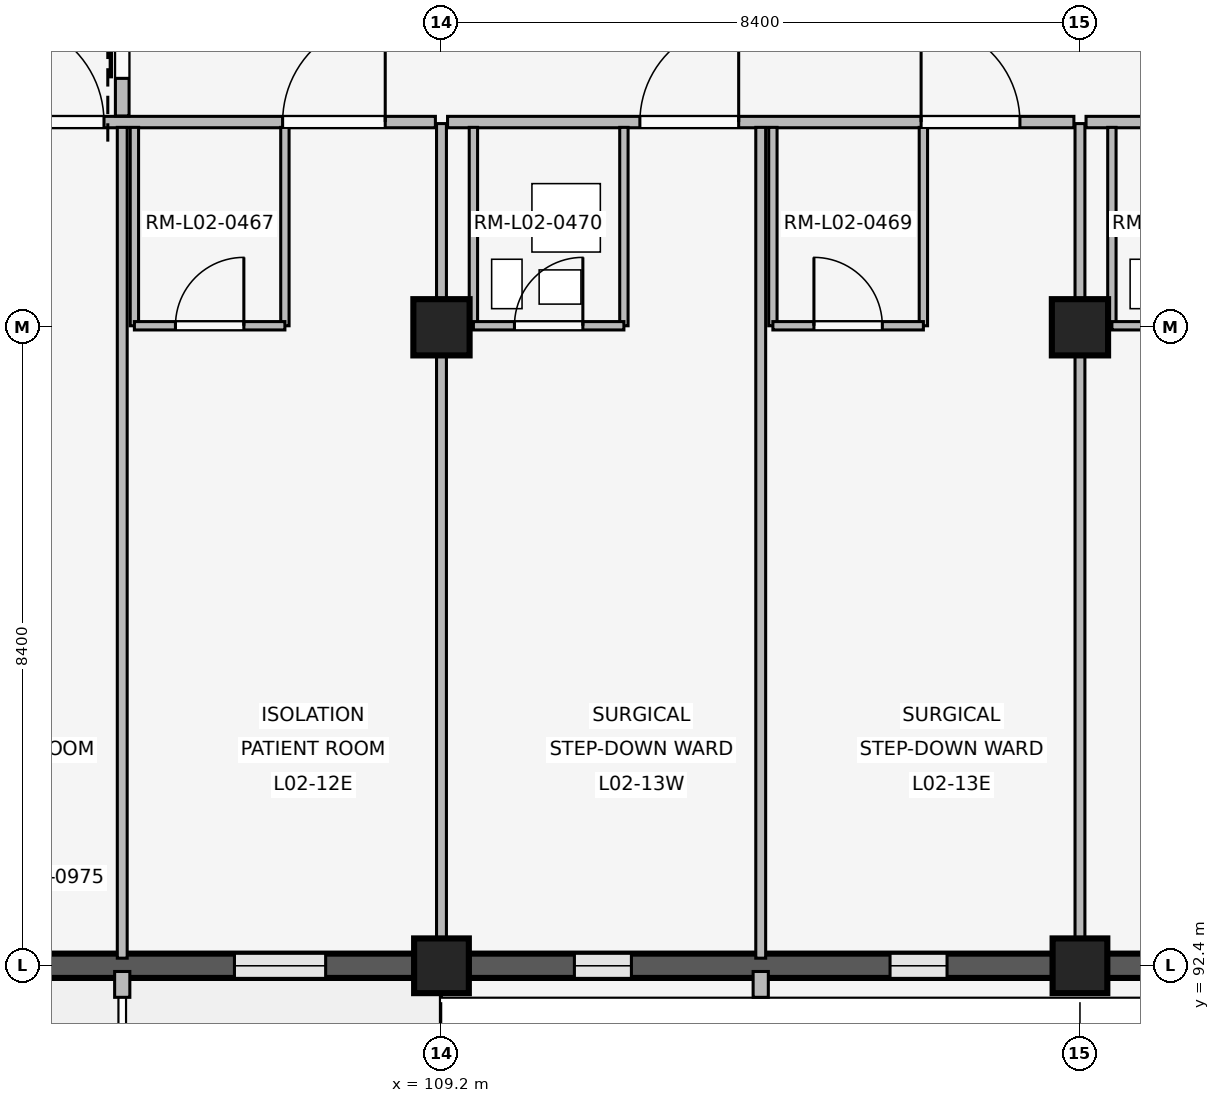
"""IFC4 building model, lengths in metres.
Left out: names, types, materials, properties, quantities, classifications, styles, units other than length and angle.
Written with IfcOpenShell. Run it as: python <this file> out.ifc"""

import sys

from ifc_helpers import new_model, si_unit, direction, frame, frame_2d, origin, origin_2d, place, context, subcontext, project, spatial, rectangle, extrude, element, fill, save


model = new_model("IFC4")
c1 = context("Model", 3, precision=1e-05, world=origin(), true_north=direction((0.0, 1.0)))
c2 = subcontext(c1, "Body", "Model", "MODEL_VIEW")
j1 = project(units=[si_unit("LENGTHUNIT", "METRE"), si_unit("PLANEANGLEUNIT", "RADIAN")], contexts=[c1])
p1 = place(None, origin())
s1 = spatial("IfcSite", under=j1, at=p1, CompositionType="ELEMENT")
p2 = place(p1, origin())
s2 = spatial("IfcBuilding", under=s1, at=p2, CompositionType="ELEMENT")
p3 = place(p2, frame((0.0, 0.0, 8.1)))
s3 = spatial("IfcBuildingStorey", under=s2, at=p3, CompositionType="ELEMENT", Elevation=8.1)
p4 = place(p3, frame((109.2, 92.4, 0.0), z_axis=(0.0, 0.0, 1.0), x_axis=(1.0, 0.0, 0.0)))
e1 = element("IfcColumn", 1, at=p4, inside=s3, PredefinedType="COLUMN", context=c2, shape_type="SweptSolid", body=[
    extrude(rectangle(XDim=0.72, YDim=0.72, at=origin_2d()), origin(), (0.0, 0.0, 1.0), 4.8),
])
p5 = place(p3, frame((109.2, 100.8, 0.0), z_axis=(0.0, 0.0, 1.0), x_axis=(1.0, 0.0, 0.0)))
e2 = element("IfcColumn", 2, at=p5, inside=s3, PredefinedType="COLUMN", context=c2, shape_type="SweptSolid", body=[
    extrude(rectangle(XDim=0.74, YDim=0.74, at=origin_2d()), origin(), (0.0, 0.0, 1.0), 4.8),
])
p6 = place(p3, frame((117.6, 92.4, 0.0), z_axis=(0.0, 0.0, 1.0), x_axis=(1.0, 0.0, 0.0)))
e3 = element("IfcColumn", 3, at=p6, inside=s3, PredefinedType="COLUMN", context=c2, shape_type="SweptSolid", body=[
    extrude(rectangle(XDim=0.72, YDim=0.72, at=origin_2d()), origin(), (0.0, 0.0, 1.0), 4.8),
])
p7 = place(p3, frame((117.6, 100.8, 0.0), z_axis=(0.0, 0.0, 1.0), x_axis=(1.0, 0.0, 0.0)))
e4 = element("IfcColumn", 4, at=p7, inside=s3, PredefinedType="COLUMN", context=c2, shape_type="SweptSolid", body=[
    extrude(rectangle(XDim=0.74, YDim=0.74, at=origin_2d()), origin(), (0.0, 0.0, 1.0), 4.8),
])
p8 = place(p3, frame((108.845, 92.4, 0.0), z_axis=(0.0, 0.0, 1.0), x_axis=(-1.0, 0.0, 0.0)))
e5 = element("IfcWall", 5, at=p8, inside=s3, PredefinedType="SOLIDWALL", context=c2, shape_type="SweptSolid", body=[
    extrude(rectangle(XDim=7.69, YDim=0.32, at=frame_2d((3.845, 0.0))), origin(), (0.0, 0.0, 1.0), 3.86),
])
p9 = place(p8, frame((1.169, 0.0, 0.85)))
e6 = element("IfcOpeningElement", 6, at=p9, cuts=e5, PredefinedType="OPENING", context=c2, shape_type="SweptSolid", body=[
    extrude(rectangle(XDim=1.2, YDim=1.55, at=frame_2d((0.6, 0.775))), frame((0.0, 0.17, 0.0), z_axis=(0.0, -1.0, 0.0), x_axis=(1.0, 0.0, 0.0)), (0.0, 0.0, 1.0), 0.34),
])
p10 = place(p8, frame((5.321, 0.0, 0.85)))
e7 = element("IfcOpeningElement", 7, at=p10, cuts=e5, PredefinedType="OPENING", context=c2, shape_type="SweptSolid", body=[
    extrude(rectangle(XDim=1.2, YDim=1.55, at=frame_2d((0.6, 0.775))), frame((0.0, 0.17, 0.0), z_axis=(0.0, -1.0, 0.0), x_axis=(1.0, 0.0, 0.0)), (0.0, 0.0, 1.0), 0.34),
])
p11 = place(p3, frame((105.0, 92.325, 0.0), z_axis=(0.0, 0.0, 1.0), x_axis=(0.0, -1.0, 0.0)))
e8 = element("IfcWall", 8, at=p11, inside=s3, PredefinedType="ELEMENTEDWALL", context=c2, shape_type="SweptSolid", body=[
    extrude(rectangle(XDim=0.34, YDim=0.2, at=frame_2d((0.17, 0.0))), origin(), (0.0, 0.0, 1.0), 3.84),
])
p12 = place(p3, frame((117.245, 92.4, 0.0), z_axis=(0.0, 0.0, 1.0), x_axis=(-1.0, 0.0, 0.0)))
e9 = element("IfcWall", 9, at=p12, inside=s3, PredefinedType="SOLIDWALL", context=c2, shape_type="SweptSolid", body=[
    extrude(rectangle(XDim=7.69, YDim=0.32, at=frame_2d((3.845, 0.0))), origin(), (0.0, 0.0, 1.0), 3.86),
])
p13 = place(p12, frame((1.394, 0.0, 0.85)))
e10 = element("IfcOpeningElement", 10, at=p13, cuts=e9, PredefinedType="OPENING", context=c2, shape_type="SweptSolid", body=[
    extrude(rectangle(XDim=0.75, YDim=1.85, at=frame_2d((0.375, 0.925))), frame((0.0, 0.17, 0.0), z_axis=(0.0, -1.0, 0.0), x_axis=(1.0, 0.0, 0.0)), (0.0, 0.0, 1.0), 0.34),
])
p14 = place(p12, frame((5.546, 0.0, 0.85)))
e11 = element("IfcOpeningElement", 11, at=p14, cuts=e9, PredefinedType="OPENING", context=c2, shape_type="SweptSolid", body=[
    extrude(rectangle(XDim=0.75, YDim=1.85, at=frame_2d((0.375, 0.925))), frame((0.0, 0.17, 0.0), z_axis=(0.0, -1.0, 0.0), x_axis=(1.0, 0.0, 0.0)), (0.0, 0.0, 1.0), 0.34),
])
p15 = place(p3, frame((113.4, 92.325, 0.0), z_axis=(0.0, 0.0, 1.0), x_axis=(0.0, -1.0, 0.0)))
e12 = element("IfcWall", 12, at=p15, inside=s3, PredefinedType="ELEMENTEDWALL", context=c2, shape_type="SweptSolid", body=[
    extrude(rectangle(XDim=0.34, YDim=0.2, at=frame_2d((0.17, 0.0))), origin(), (0.0, 0.0, 1.0), 3.84),
])
p16 = place(p3, frame((125.645, 92.4, 0.0), z_axis=(0.0, 0.0, 1.0), x_axis=(-1.0, 0.0, 0.0)))
e13 = element("IfcWall", 13, at=p16, inside=s3, PredefinedType="SOLIDWALL", context=c2, shape_type="SweptSolid", body=[
    extrude(rectangle(XDim=7.69, YDim=0.32, at=frame_2d((3.845, 0.0))), origin(), (0.0, 0.0, 1.0), 3.86),
])
p17 = place(p16, frame((1.444, 0.0, 0.85)))
e14 = element("IfcOpeningElement", 14, at=p17, cuts=e13, PredefinedType="OPENING", context=c2, shape_type="SweptSolid", body=[
    extrude(rectangle(XDim=0.65, YDim=1.75, at=frame_2d((0.325, 0.875))), frame((0.0, 0.17, 0.0), z_axis=(0.0, -1.0, 0.0), x_axis=(1.0, 0.0, 0.0)), (0.0, 0.0, 1.0), 0.34),
])
p18 = place(p16, frame((5.596, 0.0, 0.85)))
e15 = element("IfcOpeningElement", 15, at=p18, cuts=e13, PredefinedType="OPENING", context=c2, shape_type="SweptSolid", body=[
    extrude(rectangle(XDim=0.65, YDim=1.75, at=frame_2d((0.325, 0.875))), frame((0.0, 0.17, 0.0), z_axis=(0.0, -1.0, 0.0), x_axis=(1.0, 0.0, 0.0)), (0.0, 0.0, 1.0), 0.34),
])
p19 = place(p3, frame((100.88, 103.5, 0.0), z_axis=(0.0, 0.0, 1.0), x_axis=(1.0, 0.0, 0.0)))
e16 = element("IfcWall", 16, at=p19, inside=s3, PredefinedType="PARTITIONING", context=c2, shape_type="SweptSolid", body=[
    extrude(rectangle(XDim=8.24, YDim=0.15, at=frame_2d((4.12, 0.0))), origin(), (0.0, 0.0, 1.0), 3.84),
])
p20 = place(p19, frame((2.53, 0.0, 0.0)))
e17 = element("IfcOpeningElement", 17, at=p20, cuts=e16, PredefinedType="OPENING", context=c2, shape_type="SweptSolid", body=[
    extrude(rectangle(XDim=1.35, YDim=2.25, at=frame_2d((0.675, 1.125))), frame((0.0, 0.085, 0.0), z_axis=(0.0, -1.0, 0.0), x_axis=(1.0, 0.0, 0.0)), (0.0, 0.0, 1.0), 0.17),
])
p21 = place(p19, frame((6.23, 0.0, 0.0)))
e18 = element("IfcOpeningElement", 18, at=p21, cuts=e16, PredefinedType="OPENING", context=c2, shape_type="SweptSolid", body=[
    extrude(rectangle(XDim=1.35, YDim=2.25, at=frame_2d((0.675, 1.125))), frame((0.0, 0.085, 0.0), z_axis=(0.0, -1.0, 0.0), x_axis=(1.0, 0.0, 0.0)), (0.0, 0.0, 1.0), 0.17),
])
p22 = place(p3, frame((105.0, 92.5, 0.0), z_axis=(0.0, 0.0, 1.0), x_axis=(0.0, 1.0, 0.0)))
e19 = element("IfcWall", 19, at=p22, inside=s3, PredefinedType="PARTITIONING", context=c2, shape_type="SweptSolid", body=[
    extrude(rectangle(XDim=10.93, YDim=0.13, at=frame_2d((5.465, 0.0))), origin(), (0.0, 0.0, 1.0), 3.84),
])
for number, where, z_axis, x_axis in (
    (20, (105.16, 100.82, 0.0), (0.0, 0.0, 1.0), (0.0, 1.0, 0.0)),
    (21, (107.14, 100.82, 0.0), (0.0, 0.0, 1.0), (0.0, 1.0, 0.0)),
):
    element("IfcWall", number, at=place(p3, frame(where, z_axis=z_axis, x_axis=x_axis)), inside=s3, PredefinedType="PARTITIONING", context=c2, shape_type="SweptSolid", body=[
        extrude(rectangle(XDim=2.61, YDim=0.11, at=frame_2d((1.305, 0.0))), origin(), (0.0, 0.0, 1.0), 3.84),
    ])
p23 = place(p3, frame((105.16, 100.82, 0.0), z_axis=(0.0, 0.0, 1.0), x_axis=(1.0, 0.0, 0.0)))
e22 = element("IfcWall", 22, at=p23, inside=s3, PredefinedType="PARTITIONING", context=c2, shape_type="SweptSolid", body=[
    extrude(rectangle(XDim=1.98, YDim=0.11, at=frame_2d((0.99, 0.0))), origin(), (0.0, 0.0, 1.0), 3.84),
])
p24 = place(p23, frame((0.54, 0.0, 0.0)))
e23 = element("IfcOpeningElement", 23, at=p24, cuts=e22, PredefinedType="OPENING", context=c2, shape_type="SweptSolid", body=[
    extrude(rectangle(XDim=0.9, YDim=2.1, at=frame_2d((0.45, 1.05))), frame((0.0, 0.065, 0.0), z_axis=(0.0, -1.0, 0.0), x_axis=(1.0, 0.0, 0.0)), (0.0, 0.0, 1.0), 0.13),
])
p25 = place(p3, frame((103.65, 93.55, 0.0), z_axis=(0.0, 0.0, 1.0), x_axis=(1.0, 0.0, 0.0)))
e24 = element("IfcWall", 24, at=p25, inside=s3, PredefinedType="PLUMBINGWALL", context=c2, shape_type="SweptSolid", body=[
    extrude(rectangle(XDim=0.9, YDim=0.24, at=frame_2d((0.45, 0.0))), origin(), (0.0, 0.0, 1.0), 3.84),
])
p26 = place(p3, frame((105.0, 103.58, 0.0), z_axis=(0.0, 0.0, 1.0), x_axis=(0.0, 1.0, 0.0)))
e25 = element("IfcWall", 25, at=p26, inside=s3, PredefinedType="PARTITIONING", context=c2, shape_type="SweptSolid", body=[
    extrude(rectangle(XDim=2.84, YDim=0.18, at=frame_2d((1.42, 0.0))), origin(), (0.0, 0.0, 1.0), 3.84),
])
p27 = place(p26, frame((0.495, 0.0, 0.0)))
e26 = element("IfcOpeningElement", 26, at=p27, cuts=e25, PredefinedType="OPENING", context=c2, shape_type="SweptSolid", body=[
    extrude(rectangle(XDim=1.85, YDim=2.3, at=frame_2d((0.925, 1.15))), frame((0.0, 0.1, 0.0), z_axis=(0.0, -1.0, 0.0), x_axis=(1.0, 0.0, 0.0)), (0.0, 0.0, 1.0), 0.2),
])
p28 = place(p3, frame((109.2, 92.54, 0.0), z_axis=(0.0, 0.0, 1.0), x_axis=(0.0, 1.0, 0.0)))
e27 = element("IfcWall", 27, at=p28, inside=s3, PredefinedType="PARTITIONING", context=c2, shape_type="SweptSolid", body=[
    extrude(rectangle(XDim=10.94, YDim=0.13, at=frame_2d((5.47, 0.0))), origin(), (0.0, 0.0, 1.0), 3.84),
])
p29 = place(p3, frame((109.28, 103.5, 0.0), z_axis=(0.0, 0.0, 1.0), x_axis=(1.0, 0.0, 0.0)))
e28 = element("IfcWall", 28, at=p29, inside=s3, PredefinedType="PARTITIONING", context=c2, shape_type="SweptSolid", body=[
    extrude(rectangle(XDim=8.24, YDim=0.15, at=frame_2d((4.12, 0.0))), origin(), (0.0, 0.0, 1.0), 3.84),
])
p30 = place(p29, frame((2.53, 0.0, 0.0)))
e29 = element("IfcOpeningElement", 29, at=p30, cuts=e28, PredefinedType="OPENING", context=c2, shape_type="SweptSolid", body=[
    extrude(rectangle(XDim=1.3, YDim=2.25, at=frame_2d((0.65, 1.125))), frame((0.0, 0.085, 0.0), z_axis=(0.0, -1.0, 0.0), x_axis=(1.0, 0.0, 0.0)), (0.0, 0.0, 1.0), 0.17),
])
p31 = place(p29, frame((6.23, 0.0, 0.0)))
e30 = element("IfcOpeningElement", 30, at=p31, cuts=e28, PredefinedType="OPENING", context=c2, shape_type="SweptSolid", body=[
    extrude(rectangle(XDim=1.3, YDim=2.25, at=frame_2d((0.65, 1.125))), frame((0.0, 0.085, 0.0), z_axis=(0.0, -1.0, 0.0), x_axis=(1.0, 0.0, 0.0)), (0.0, 0.0, 1.0), 0.17),
])
p32 = place(p3, frame((113.4, 92.5, 0.0), z_axis=(0.0, 0.0, 1.0), x_axis=(0.0, 1.0, 0.0)))
e31 = element("IfcWall", 31, at=p32, inside=s3, PredefinedType="PARTITIONING", context=c2, shape_type="SweptSolid", body=[
    extrude(rectangle(XDim=10.93, YDim=0.13, at=frame_2d((5.465, 0.0))), origin(), (0.0, 0.0, 1.0), 3.84),
])
for number, where, z_axis, x_axis in (
    (32, (109.62, 100.82, 0.0), (0.0, 0.0, 1.0), (0.0, 1.0, 0.0)),
    (33, (111.6, 100.82, 0.0), (0.0, 0.0, 1.0), (0.0, 1.0, 0.0)),
):
    element("IfcWall", number, at=place(p3, frame(where, z_axis=z_axis, x_axis=x_axis)), inside=s3, PredefinedType="PARTITIONING", context=c2, shape_type="SweptSolid", body=[
        extrude(rectangle(XDim=2.61, YDim=0.11, at=frame_2d((1.305, 0.0))), origin(), (0.0, 0.0, 1.0), 3.84),
    ])
p33 = place(p3, frame((109.62, 100.82, 0.0), z_axis=(0.0, 0.0, 1.0), x_axis=(1.0, 0.0, 0.0)))
e34 = element("IfcWall", 34, at=p33, inside=s3, PredefinedType="PARTITIONING", context=c2, shape_type="SweptSolid", body=[
    extrude(rectangle(XDim=1.98, YDim=0.11, at=frame_2d((0.99, 0.0))), origin(), (0.0, 0.0, 1.0), 3.84),
])
p34 = place(p33, frame((0.54, 0.0, 0.0)))
e35 = element("IfcOpeningElement", 35, at=p34, cuts=e34, PredefinedType="OPENING", context=c2, shape_type="SweptSolid", body=[
    extrude(rectangle(XDim=0.9, YDim=2.1, at=frame_2d((0.45, 1.05))), frame((0.0, 0.065, 0.0), z_axis=(0.0, -1.0, 0.0), x_axis=(1.0, 0.0, 0.0)), (0.0, 0.0, 1.0), 0.13),
])
for number, where, z_axis, x_axis in (
    (36, (113.56, 100.82, 0.0), (0.0, 0.0, 1.0), (0.0, 1.0, 0.0)),
    (37, (115.54, 100.82, 0.0), (0.0, 0.0, 1.0), (0.0, 1.0, 0.0)),
):
    element("IfcWall", number, at=place(p3, frame(where, z_axis=z_axis, x_axis=x_axis)), inside=s3, PredefinedType="PARTITIONING", context=c2, shape_type="SweptSolid", body=[
        extrude(rectangle(XDim=2.61, YDim=0.11, at=frame_2d((1.305, 0.0))), origin(), (0.0, 0.0, 1.0), 3.84),
    ])
p35 = place(p3, frame((113.56, 100.82, 0.0), z_axis=(0.0, 0.0, 1.0), x_axis=(1.0, 0.0, 0.0)))
e38 = element("IfcWall", 38, at=p35, inside=s3, PredefinedType="PARTITIONING", context=c2, shape_type="SweptSolid", body=[
    extrude(rectangle(XDim=1.98, YDim=0.11, at=frame_2d((0.99, 0.0))), origin(), (0.0, 0.0, 1.0), 3.84),
])
p36 = place(p35, frame((0.54, 0.0, 0.0)))
e39 = element("IfcOpeningElement", 39, at=p36, cuts=e38, PredefinedType="OPENING", context=c2, shape_type="SweptSolid", body=[
    extrude(rectangle(XDim=0.9, YDim=2.1, at=frame_2d((0.45, 1.05))), frame((0.0, 0.065, 0.0), z_axis=(0.0, -1.0, 0.0), x_axis=(1.0, 0.0, 0.0)), (0.0, 0.0, 1.0), 0.13),
])
p37 = place(p3, frame((117.6, 92.54, 0.0), z_axis=(0.0, 0.0, 1.0), x_axis=(0.0, 1.0, 0.0)))
e40 = element("IfcWall", 40, at=p37, inside=s3, PredefinedType="PARTITIONING", context=c2, shape_type="SweptSolid", body=[
    extrude(rectangle(XDim=10.94, YDim=0.13, at=frame_2d((5.47, 0.0))), origin(), (0.0, 0.0, 1.0), 3.84),
])
p38 = place(p3, frame((117.68, 103.5, 0.0), z_axis=(0.0, 0.0, 1.0), x_axis=(1.0, 0.0, 0.0)))
e41 = element("IfcWall", 41, at=p38, inside=s3, PredefinedType="PARTITIONING", context=c2, shape_type="SweptSolid", body=[
    extrude(rectangle(XDim=8.24, YDim=0.15, at=frame_2d((4.12, 0.0))), origin(), (0.0, 0.0, 1.0), 3.84),
])
p39 = place(p38, frame((2.53, 0.0, 0.0)))
e42 = element("IfcOpeningElement", 42, at=p39, cuts=e41, PredefinedType="OPENING", context=c2, shape_type="SweptSolid", body=[
    extrude(rectangle(XDim=1.3, YDim=2.25, at=frame_2d((0.65, 1.125))), frame((0.0, 0.085, 0.0), z_axis=(0.0, -1.0, 0.0), x_axis=(1.0, 0.0, 0.0)), (0.0, 0.0, 1.0), 0.17),
])
p40 = place(p38, frame((6.23, 0.0, 0.0)))
e43 = element("IfcOpeningElement", 43, at=p40, cuts=e41, PredefinedType="OPENING", context=c2, shape_type="SweptSolid", body=[
    extrude(rectangle(XDim=1.3, YDim=2.25, at=frame_2d((0.65, 1.125))), frame((0.0, 0.085, 0.0), z_axis=(0.0, -1.0, 0.0), x_axis=(1.0, 0.0, 0.0)), (0.0, 0.0, 1.0), 0.17),
])
p41 = place(p3, frame((118.02, 100.82, 0.0), z_axis=(0.0, 0.0, 1.0), x_axis=(0.0, 1.0, 0.0)))
e44 = element("IfcWall", 44, at=p41, inside=s3, PredefinedType="PARTITIONING", context=c2, shape_type="SweptSolid", body=[
    extrude(rectangle(XDim=2.61, YDim=0.11, at=frame_2d((1.305, 0.0))), origin(), (0.0, 0.0, 1.0), 3.84),
])
p42 = place(p3, frame((118.02, 100.82, 0.0), z_axis=(0.0, 0.0, 1.0), x_axis=(1.0, 0.0, 0.0)))
e45 = element("IfcWall", 45, at=p42, inside=s3, PredefinedType="PARTITIONING", context=c2, shape_type="SweptSolid", body=[
    extrude(rectangle(XDim=1.98, YDim=0.11, at=frame_2d((0.99, 0.0))), origin(), (0.0, 0.0, 1.0), 3.84),
])
p43 = place(p42, frame((0.54, 0.0, 0.0)))
e46 = element("IfcOpeningElement", 46, at=p43, cuts=e45, PredefinedType="OPENING", context=c2, shape_type="SweptSolid", body=[
    extrude(rectangle(XDim=0.9, YDim=2.1, at=frame_2d((0.45, 1.05))), frame((0.0, 0.065, 0.0), z_axis=(0.0, -1.0, 0.0), x_axis=(1.0, 0.0, 0.0)), (0.0, 0.0, 1.0), 0.13),
])
p44 = place(p9, origin())
e47 = element("IfcWindow", 47, at=p44, inside=s3, PartitioningType="SINGLE_PANEL", PredefinedType="WINDOW", context=c2, shape_type="SweptSolid", body=[
    extrude(rectangle(XDim=1.2, YDim=1.55, at=frame_2d((0.6, 0.775))), frame((0.0, 0.03, 0.0), z_axis=(0.0, -1.0, 0.0), x_axis=(1.0, 0.0, 0.0)), (0.0, 0.0, 1.0), 0.06),
])
fill(e6, e47)
p45 = place(p13, origin())
e48 = element("IfcWindow", 48, at=p45, inside=s3, PartitioningType="SINGLE_PANEL", PredefinedType="WINDOW", context=c2, shape_type="SweptSolid", body=[
    extrude(rectangle(XDim=0.75, YDim=1.85, at=frame_2d((0.375, 0.925))), frame((0.0, 0.03, 0.0), z_axis=(0.0, -1.0, 0.0), x_axis=(1.0, 0.0, 0.0)), (0.0, 0.0, 1.0), 0.06),
])
fill(e10, e48)
p46 = place(p14, origin())
e49 = element("IfcWindow", 49, at=p46, inside=s3, PartitioningType="SINGLE_PANEL", PredefinedType="WINDOW", context=c2, shape_type="SweptSolid", body=[
    extrude(rectangle(XDim=0.75, YDim=1.85, at=frame_2d((0.375, 0.925))), frame((0.0, 0.03, 0.0), z_axis=(0.0, -1.0, 0.0), x_axis=(1.0, 0.0, 0.0)), (0.0, 0.0, 1.0), 0.06),
])
fill(e11, e49)
p47 = place(p20, origin())
e50 = element("IfcDoor", 50, at=p47, inside=s3, OperationType="SINGLE_SWING_LEFT", PredefinedType="DOOR", context=c2, shape_type="SweptSolid", body=[
    extrude(rectangle(XDim=1.35, YDim=2.25, at=frame_2d((0.675, 1.125))), frame((0.0, 0.025, 0.0), z_axis=(0.0, -1.0, 0.0), x_axis=(1.0, 0.0, 0.0)), (0.0, 0.0, 1.0), 0.05),
])
fill(e17, e50)
p48 = place(p21, origin())
e51 = element("IfcDoor", 51, at=p48, inside=s3, OperationType="SINGLE_SWING_RIGHT", PredefinedType="DOOR", context=c2, shape_type="SweptSolid", body=[
    extrude(rectangle(XDim=1.35, YDim=2.25, at=frame_2d((0.675, 1.125))), frame((0.0, 0.025, 0.0), z_axis=(0.0, -1.0, 0.0), x_axis=(1.0, 0.0, 0.0)), (0.0, 0.0, 1.0), 0.05),
])
fill(e18, e51)
p49 = place(p24, origin())
e52 = element("IfcDoor", 52, at=p49, inside=s3, OperationType="SINGLE_SWING_RIGHT", PredefinedType="DOOR", context=c2, shape_type="SweptSolid", body=[
    extrude(rectangle(XDim=0.9, YDim=2.1, at=frame_2d((0.45, 1.05))), frame((0.0, 0.025, 0.0), z_axis=(0.0, -1.0, 0.0), x_axis=(1.0, 0.0, 0.0)), (0.0, 0.0, 1.0), 0.05),
])
fill(e23, e52)
p50 = place(p27, origin())
e53 = element("IfcDoor", 53, at=p50, inside=s3, OperationType="SLIDING_TO_LEFT", PredefinedType="DOOR", context=c2, shape_type="SweptSolid", body=[
    extrude(rectangle(XDim=1.85, YDim=2.3, at=frame_2d((0.925, 1.15))), frame((0.0, 0.025, 0.0), z_axis=(0.0, -1.0, 0.0), x_axis=(1.0, 0.0, 0.0)), (0.0, 0.0, 1.0), 0.05),
])
fill(e26, e53)
p51 = place(p30, origin())
e54 = element("IfcDoor", 54, at=p51, inside=s3, OperationType="SINGLE_SWING_RIGHT", PredefinedType="DOOR", context=c2, shape_type="SweptSolid", body=[
    extrude(rectangle(XDim=1.3, YDim=2.25, at=frame_2d((0.65, 1.125))), frame((0.0, 0.025, 0.0), z_axis=(0.0, -1.0, 0.0), x_axis=(1.0, 0.0, 0.0)), (0.0, 0.0, 1.0), 0.05),
])
fill(e29, e54)
p52 = place(p31, origin())
e55 = element("IfcDoor", 55, at=p52, inside=s3, OperationType="SINGLE_SWING_LEFT", PredefinedType="DOOR", context=c2, shape_type="SweptSolid", body=[
    extrude(rectangle(XDim=1.3, YDim=2.25, at=frame_2d((0.65, 1.125))), frame((0.0, 0.025, 0.0), z_axis=(0.0, -1.0, 0.0), x_axis=(1.0, 0.0, 0.0)), (0.0, 0.0, 1.0), 0.05),
])
fill(e30, e55)
p53 = place(p34, origin())
e56 = element("IfcDoor", 56, at=p53, inside=s3, OperationType="SINGLE_SWING_RIGHT", PredefinedType="DOOR", context=c2, shape_type="SweptSolid", body=[
    extrude(rectangle(XDim=0.9, YDim=2.1, at=frame_2d((0.45, 1.05))), frame((0.0, 0.025, 0.0), z_axis=(0.0, -1.0, 0.0), x_axis=(1.0, 0.0, 0.0)), (0.0, 0.0, 1.0), 0.05),
])
fill(e35, e56)
p54 = place(p36, origin())
e57 = element("IfcDoor", 57, at=p54, inside=s3, OperationType="SINGLE_SWING_LEFT", PredefinedType="DOOR", context=c2, shape_type="SweptSolid", body=[
    extrude(rectangle(XDim=0.9, YDim=2.1, at=frame_2d((0.45, 1.05))), frame((0.0, 0.025, 0.0), z_axis=(0.0, -1.0, 0.0), x_axis=(1.0, 0.0, 0.0)), (0.0, 0.0, 1.0), 0.05),
])
fill(e39, e57)
save(model, sys.argv[1])
